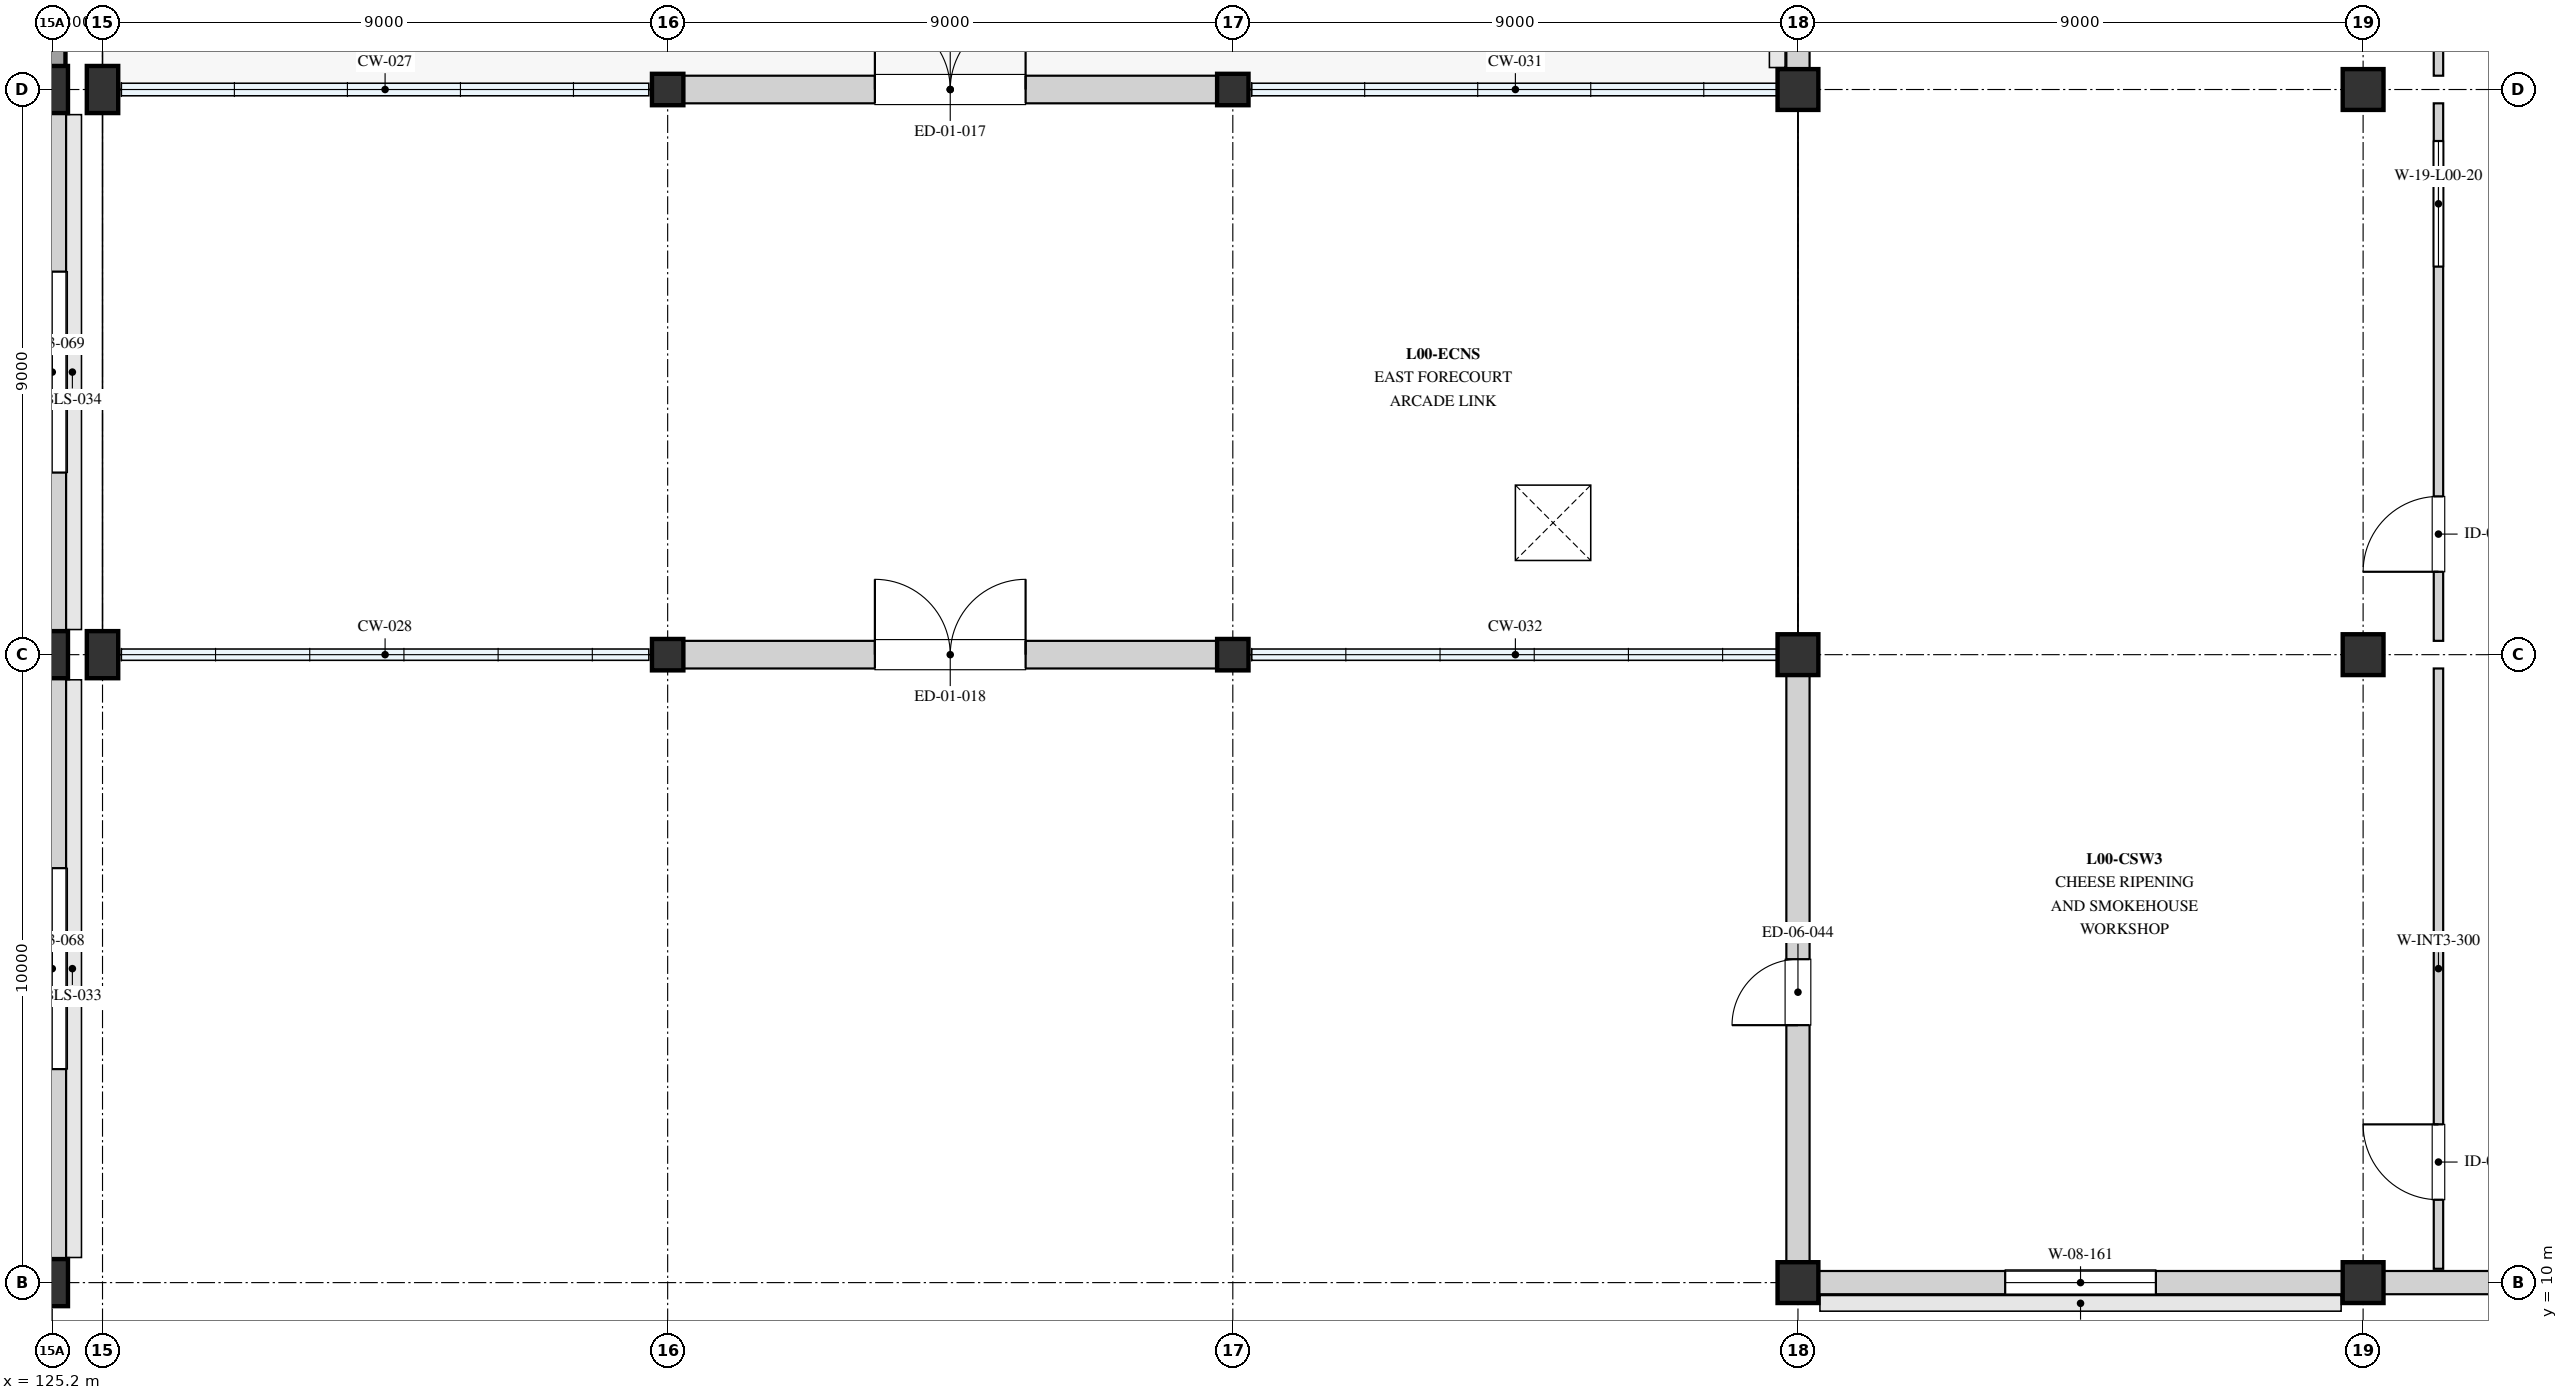
"""IFC4 building model, lengths in metres.
Left out: names, types, materials, properties, quantities, classifications, styles, units other than length and angle.
Written with IfcOpenShell. Run it as: python <this file> out.ifc"""

import sys

from ifc_helpers import new_model, si_unit, direction, frame, frame_2d, origin, origin_2d, place, context, subcontext, project, spatial, rectangle, extrude, element, fill, save


model = new_model("IFC4")
c1 = context("Model", 3, precision=1e-05, world=origin(), true_north=direction((0.0, 1.0)))
c2 = subcontext(c1, "Body", "Model", "MODEL_VIEW")
j1 = project(units=[si_unit("LENGTHUNIT", "METRE"), si_unit("PLANEANGLEUNIT", "RADIAN")], contexts=[c1])
p1 = place(None, origin())
s1 = spatial("IfcSite", under=j1, at=p1, CompositionType="ELEMENT")
p2 = place(p1, origin())
s2 = spatial("IfcBuilding", under=s1, at=p2, CompositionType="ELEMENT")
p3 = place(p2, origin())
s3 = spatial("IfcBuildingStorey", under=s2, at=p3, CompositionType="ELEMENT", Elevation=0.0)
for number, where, z_axis, x_axis in (
    (1, (125.2, 10.0, 0.0), (0.0, 0.0, 1.0), (1.0, 0.0, 0.0)),
    (2, (125.2, 20.0, 0.0), (0.0, 0.0, 1.0), (1.0, 0.0, 0.0)),
):
    element("IfcColumn", number, at=place(p3, frame(where, z_axis=z_axis, x_axis=x_axis)), inside=s3, PredefinedType="COLUMN", context=c2, shape_type="SweptSolid", body=[
        extrude(rectangle(XDim=0.5, YDim=0.75, at=origin_2d()), origin(), (0.0, 0.0, 1.0), 4.06),
    ])
for number, where, z_axis, x_axis in (
    (3, (125.2, 29.0, 0.0), (0.0, 0.0, 1.0), (1.0, 0.0, 0.0)),
    (4, (126.0, 20.0, 0.0), (0.0, 0.0, 1.0), (1.0, 0.0, 0.0)),
    (5, (126.0, 29.0, 0.0), (0.0, 0.0, 1.0), (1.0, 0.0, 0.0)),
):
    element("IfcColumn", number, at=place(p3, frame(where, z_axis=z_axis, x_axis=x_axis)), inside=s3, PredefinedType="COLUMN", context=c2, shape_type="SweptSolid", body=[
        extrude(rectangle(XDim=0.5, YDim=0.75, at=origin_2d()), origin(), (0.0, 0.0, 1.0), 4.5),
    ])
for number, where, z_axis, x_axis in (
    (6, (135.0, 20.0, 0.0), (0.0, 0.0, 1.0), (1.0, 0.0, 0.0)),
    (7, (135.0, 29.0, 0.0), (0.0, 0.0, 1.0), (1.0, 0.0, 0.0)),
    (8, (144.0, 20.0, 0.0), (0.0, 0.0, 1.0), (1.0, 0.0, 0.0)),
    (9, (144.0, 29.0, 0.0), (0.0, 0.0, 1.0), (1.0, 0.0, 0.0)),
):
    element("IfcColumn", number, at=place(p3, frame(where, z_axis=z_axis, x_axis=x_axis)), inside=s3, PredefinedType="COLUMN", context=c2, shape_type="SweptSolid", body=[
        extrude(rectangle(XDim=0.5, YDim=0.5, at=origin_2d()), origin(), (0.0, 0.0, 1.0), 4.5),
    ])
for number, where, z_axis, x_axis in (
    (10, (153.0, 10.0, 0.0), (0.0, 0.0, 1.0), (1.0, 0.0, 0.0)),
    (11, (153.0, 20.0, 0.0), (0.0, 0.0, 1.0), (1.0, 0.0, 0.0)),
    (12, (153.0, 29.0, 0.0), (0.0, 0.0, 1.0), (1.0, 0.0, 0.0)),
    (13, (162.0, 10.0, 0.0), (0.0, 0.0, 1.0), (1.0, 0.0, 0.0)),
    (14, (162.0, 20.0, 0.0), (0.0, 0.0, 1.0), (1.0, 0.0, 0.0)),
    (15, (162.0, 29.0, 0.0), (0.0, 0.0, 1.0), (1.0, 0.0, 0.0)),
):
    element("IfcColumn", number, at=place(p3, frame(where, z_axis=z_axis, x_axis=x_axis)), inside=s3, PredefinedType="COLUMN", context=c2, shape_type="SweptSolid", body=[
        extrude(rectangle(XDim=0.65, YDim=0.65, at=origin_2d()), origin(), (0.0, 0.0, 1.0), 4.5),
    ])
p4 = place(p3, frame((135.0, 29.0, 0.0), z_axis=(0.0, 0.0, 1.0), x_axis=(1.0, 0.0, 0.0)))
e16 = element("IfcWall", 16, at=p4, inside=s3, PredefinedType="STANDARD", context=c2, shape_type="SweptSolid", body=[
    extrude(rectangle(XDim=9.0, YDim=0.44, at=frame_2d((4.5, 0.0))), origin(), (0.0, 0.0, 1.0), 3.6),
])
p5 = place(p4, frame((3.3, 0.0, 0.0)))
e17 = element("IfcOpeningElement", 17, at=p5, cuts=e16, PredefinedType="OPENING", context=c2, shape_type="SweptSolid", body=[
    extrude(rectangle(XDim=2.4, YDim=2.6, at=frame_2d((1.2, 1.3))), frame((0.0, 0.23, 0.0), z_axis=(0.0, -1.0, 0.0), x_axis=(1.0, 0.0, 0.0)), (0.0, 0.0, 1.0), 0.46),
])
p6 = place(p3, frame((135.0, 20.0, 0.0), z_axis=(0.0, 0.0, 1.0), x_axis=(1.0, 0.0, 0.0)))
e18 = element("IfcWall", 18, at=p6, inside=s3, PredefinedType="STANDARD", context=c2, shape_type="SweptSolid", body=[
    extrude(rectangle(XDim=9.0, YDim=0.44, at=frame_2d((4.5, 0.0))), origin(), (0.0, 0.0, 1.0), 3.6),
])
p7 = place(p6, frame((3.3, 0.0, 0.0)))
e19 = element("IfcOpeningElement", 19, at=p7, cuts=e18, PredefinedType="OPENING", context=c2, shape_type="SweptSolid", body=[
    extrude(rectangle(XDim=2.4, YDim=2.6, at=frame_2d((1.2, 1.3))), frame((0.0, 0.23, 0.0), z_axis=(0.0, -1.0, 0.0), x_axis=(1.0, 0.0, 0.0)), (0.0, 0.0, 1.0), 0.46),
])
p8 = place(p3, frame((117.0, 10.0, 0.0), z_axis=(0.0, 0.0, 1.0), x_axis=(1.0, 0.0, 0.0)))
e20 = element("IfcWall", 20, at=p8, inside=s3, PredefinedType="STANDARD", context=c2, shape_type="SweptSolid", body=[
    extrude(rectangle(XDim=8.2, YDim=0.44, at=frame_2d((4.1, 0.0))), origin(), (0.0, 0.0, 1.0), 3.19),
])
p9 = place(p8, frame((3.2, 0.0, 0.0)))
e21 = element("IfcOpeningElement", 21, at=p9, cuts=e20, PredefinedType="OPENING", context=c2, shape_type="SweptSolid", body=[
    extrude(rectangle(XDim=1.1, YDim=2.2, at=frame_2d((0.55, 1.1))), frame((0.0, 0.23, 0.0), z_axis=(0.0, -1.0, 0.0), x_axis=(1.0, 0.0, 0.0)), (0.0, 0.0, 1.0), 0.46),
])
p10 = place(p3, frame((125.2, 10.0, 0.0), z_axis=(0.0, 0.0, 1.0), x_axis=(0.0, 1.0, 0.0)))
e22 = element("IfcWall", 22, at=p10, inside=s3, PredefinedType="STANDARD", context=c2, shape_type="SweptSolid", body=[
    extrude(rectangle(XDim=10.0, YDim=0.44, at=frame_2d((5.0, 0.0))), origin(), (0.0, 0.0, 1.0), 3.19),
])
p11 = place(p10, frame((3.4, 0.0, 1.5)))
e23 = element("IfcOpeningElement", 23, at=p11, cuts=e22, PredefinedType="OPENING", context=c2, shape_type="SweptSolid", body=[
    extrude(rectangle(XDim=3.2, YDim=1.5, at=frame_2d((1.6, 0.75))), frame((0.0, 0.23, 0.0), z_axis=(0.0, -1.0, 0.0), x_axis=(1.0, 0.0, 0.0)), (0.0, 0.0, 1.0), 0.46),
])
p12 = place(p3, frame((125.2, 20.0, 0.0), z_axis=(0.0, 0.0, 1.0), x_axis=(0.0, 1.0, 0.0)))
e24 = element("IfcWall", 24, at=p12, inside=s3, PredefinedType="STANDARD", context=c2, shape_type="SweptSolid", body=[
    extrude(rectangle(XDim=9.0, YDim=0.44, at=frame_2d((4.5, 0.0))), origin(), (0.0, 0.0, 1.0), 3.19),
])
p13 = place(p12, frame((2.9, 0.0, 1.5)))
e25 = element("IfcOpeningElement", 25, at=p13, cuts=e24, PredefinedType="OPENING", context=c2, shape_type="SweptSolid", body=[
    extrude(rectangle(XDim=3.2, YDim=1.5, at=frame_2d((1.6, 0.75))), frame((0.0, 0.23, 0.0), z_axis=(0.0, -1.0, 0.0), x_axis=(1.0, 0.0, 0.0)), (0.0, 0.0, 1.0), 0.46),
])
p14 = place(p3, frame((125.2, 29.0, 0.0), z_axis=(0.0, 0.0, 1.0), x_axis=(0.0, 1.0, 0.0)))
e26 = element("IfcWall", 26, at=p14, inside=s3, PredefinedType="STANDARD", context=c2, shape_type="SweptSolid", body=[
    extrude(rectangle(XDim=9.0, YDim=0.42, at=frame_2d((4.5, 0.0))), origin(), (0.0, 0.0, 1.0), 4.24),
])
p15 = place(p3, frame((153.0, 10.0, 0.0), z_axis=(0.0, 0.0, 1.0), x_axis=(0.0, 1.0, 0.0)))
e27 = element("IfcWall", 27, at=p15, inside=s3, PredefinedType="STANDARD", context=c2, shape_type="SweptSolid", body=[
    extrude(rectangle(XDim=10.0, YDim=0.37, at=frame_2d((5.0, 0.0))), origin(), (0.0, 0.0, 1.0), 3.38),
])
p16 = place(p15, frame((4.1, 0.0, 0.0)))
e28 = element("IfcOpeningElement", 28, at=p16, cuts=e27, PredefinedType="OPENING", context=c2, shape_type="SweptSolid", body=[
    extrude(rectangle(XDim=1.05, YDim=2.15, at=frame_2d((0.525, 1.075))), frame((0.0, 0.195, 0.0), z_axis=(0.0, -1.0, 0.0), x_axis=(1.0, 0.0, 0.0)), (0.0, 0.0, 1.0), 0.39),
])
p17 = place(p3, frame((153.0, 29.0, 0.0), z_axis=(0.0, 0.0, 1.0), x_axis=(0.0, 1.0, 0.0)))
e29 = element("IfcWall", 29, at=p17, inside=s3, PredefinedType="STANDARD", context=c2, shape_type="SweptSolid", body=[
    extrude(rectangle(XDim=9.0, YDim=0.37, at=frame_2d((4.5, 0.0))), origin(), (0.0, 0.0, 1.0), 3.38),
])
p18 = place(p17, frame((3.3, 0.0, 0.9)))
e30 = element("IfcOpeningElement", 30, at=p18, cuts=e29, PredefinedType="OPENING", context=c2, shape_type="SweptSolid", body=[
    extrude(rectangle(XDim=2.4, YDim=2.0, at=frame_2d((1.2, 1.0))), frame((0.0, 0.195, 0.0), z_axis=(0.0, -1.0, 0.0), x_axis=(1.0, 0.0, 0.0)), (0.0, 0.0, 1.0), 0.39),
])
p19 = place(p3, frame((153.0, 10.0, 0.0), z_axis=(0.0, 0.0, 1.0), x_axis=(1.0, 0.0, 0.0)))
e31 = element("IfcWall", 31, at=p19, inside=s3, PredefinedType="STANDARD", context=c2, shape_type="SweptSolid", body=[
    extrude(rectangle(XDim=9.0, YDim=0.37, at=frame_2d((4.5, 0.0))), origin(), (0.0, 0.0, 1.0), 3.38),
])
p20 = place(p19, frame((3.3, 0.0, 0.9)))
e32 = element("IfcOpeningElement", 32, at=p20, cuts=e31, PredefinedType="OPENING", context=c2, shape_type="SweptSolid", body=[
    extrude(rectangle(XDim=2.4, YDim=2.0, at=frame_2d((1.2, 1.0))), frame((0.0, 0.195, 0.0), z_axis=(0.0, -1.0, 0.0), x_axis=(1.0, 0.0, 0.0)), (0.0, 0.0, 1.0), 0.39),
])
p21 = place(p3, frame((162.0, 10.0, 0.0), z_axis=(0.0, 0.0, 1.0), x_axis=(1.0, 0.0, 0.0)))
e33 = element("IfcWall", 33, at=p21, inside=s3, PredefinedType="STANDARD", context=c2, shape_type="SweptSolid", body=[
    extrude(rectangle(XDim=9.0, YDim=0.37, at=frame_2d((4.5, 0.0))), origin(), (0.0, 0.0, 1.0), 3.38),
])
p22 = place(p21, frame((3.45, 0.0, 0.0)))
e34 = element("IfcOpeningElement", 34, at=p22, cuts=e33, PredefinedType="OPENING", context=c2, shape_type="SweptSolid", body=[
    extrude(rectangle(XDim=2.1, YDim=2.5, at=frame_2d((1.05, 1.25))), frame((0.0, 0.195, 0.0), z_axis=(0.0, -1.0, 0.0), x_axis=(1.0, 0.0, 0.0)), (0.0, 0.0, 1.0), 0.39),
])
p23 = place(p3, frame((163.2, 10.22, 0.0), z_axis=(0.0, 0.0, 1.0), x_axis=(0.0, 1.0, 0.0)))
e35 = element("IfcWall", 35, at=p23, inside=s3, PredefinedType="PARTITIONING", context=c2, shape_type="SweptSolid", body=[
    extrude(rectangle(XDim=9.56, YDim=0.15, at=frame_2d((4.78, 0.0))), origin(), (0.0, 0.0, 1.0), 3.2),
])
p24 = place(p23, frame((1.1, 0.0, 0.0)))
e36 = element("IfcOpeningElement", 36, at=p24, cuts=e35, PredefinedType="OPENING", context=c2, shape_type="SweptSolid", body=[
    extrude(rectangle(XDim=1.2, YDim=2.15, at=frame_2d((0.6, 1.075))), frame((0.0, 0.085, 0.0), z_axis=(0.0, -1.0, 0.0), x_axis=(1.0, 0.0, 0.0)), (0.0, 0.0, 1.0), 0.17),
])
p25 = place(p3, frame((163.2, 20.22, 0.0), z_axis=(0.0, 0.0, 1.0), x_axis=(0.0, 1.0, 0.0)))
e37 = element("IfcWall", 37, at=p25, inside=s3, PredefinedType="PARTITIONING", context=c2, shape_type="SweptSolid", body=[
    extrude(rectangle(XDim=8.56, YDim=0.15, at=frame_2d((4.28, 0.0))), origin(), (0.0, 0.0, 1.0), 3.2),
])
p26 = place(p25, frame((1.1, 0.0, 0.0)))
e38 = element("IfcOpeningElement", 38, at=p26, cuts=e37, PredefinedType="OPENING", context=c2, shape_type="SweptSolid", body=[
    extrude(rectangle(XDim=1.2, YDim=2.15, at=frame_2d((0.6, 1.075))), frame((0.0, 0.085, 0.0), z_axis=(0.0, -1.0, 0.0), x_axis=(1.0, 0.0, 0.0)), (0.0, 0.0, 1.0), 0.17),
])
p27 = place(p25, frame((5.96, 0.0, 1.05)))
e39 = element("IfcOpeningElement", 39, at=p27, cuts=e37, PredefinedType="OPENING", context=c2, shape_type="SweptSolid", body=[
    extrude(rectangle(XDim=2.0, YDim=1.35, at=frame_2d((1.0, 0.675))), frame((0.0, 0.085, 0.0), z_axis=(0.0, -1.0, 0.0), x_axis=(1.0, 0.0, 0.0)), (0.0, 0.0, 1.0), 0.17),
])
p28 = place(p3, frame((163.2, 29.22, 0.0), z_axis=(0.0, 0.0, 1.0), x_axis=(0.0, 1.0, 0.0)))
e40 = element("IfcWall", 40, at=p28, inside=s3, PredefinedType="PARTITIONING", context=c2, shape_type="SweptSolid", body=[
    extrude(rectangle(XDim=8.56, YDim=0.15, at=frame_2d((4.28, 0.0))), origin(), (0.0, 0.0, 1.0), 3.2),
])
p29 = place(p28, frame((1.1, 0.0, 0.0)))
e41 = element("IfcOpeningElement", 41, at=p29, cuts=e40, PredefinedType="OPENING", context=c2, shape_type="SweptSolid", body=[
    extrude(rectangle(XDim=1.2, YDim=2.15, at=frame_2d((0.6, 1.075))), frame((0.0, 0.085, 0.0), z_axis=(0.0, -1.0, 0.0), x_axis=(1.0, 0.0, 0.0)), (0.0, 0.0, 1.0), 0.17),
])
p30 = place(p28, frame((5.96, 0.0, 1.05)))
e42 = element("IfcOpeningElement", 42, at=p30, cuts=e40, PredefinedType="OPENING", context=c2, shape_type="SweptSolid", body=[
    extrude(rectangle(XDim=2.0, YDim=1.35, at=frame_2d((1.0, 0.675))), frame((0.0, 0.085, 0.0), z_axis=(0.0, -1.0, 0.0), x_axis=(1.0, 0.0, 0.0)), (0.0, 0.0, 1.0), 0.17),
])
p31 = place(p5, origin())
e43 = element("IfcDoor", 43, at=p31, inside=s3, OperationType="DOUBLE_DOOR_SINGLE_SWING", PredefinedType="DOOR", context=c2, shape_type="SweptSolid", body=[
    extrude(rectangle(XDim=2.4, YDim=2.6, at=frame_2d((1.2, 1.3))), frame((0.0, 0.025, 0.0), z_axis=(0.0, -1.0, 0.0), x_axis=(1.0, 0.0, 0.0)), (0.0, 0.0, 1.0), 0.05),
])
fill(e17, e43)
p32 = place(p7, origin())
e44 = element("IfcDoor", 44, at=p32, inside=s3, OperationType="DOUBLE_DOOR_SINGLE_SWING", PredefinedType="DOOR", context=c2, shape_type="SweptSolid", body=[
    extrude(rectangle(XDim=2.4, YDim=2.6, at=frame_2d((1.2, 1.3))), frame((0.0, 0.025, 0.0), z_axis=(0.0, -1.0, 0.0), x_axis=(1.0, 0.0, 0.0)), (0.0, 0.0, 1.0), 0.05),
])
fill(e19, e44)
p33 = place(p11, origin())
e45 = element("IfcWindow", 45, at=p33, inside=s3, PartitioningType="SINGLE_PANEL", PredefinedType="WINDOW", context=c2, shape_type="SweptSolid", body=[
    extrude(rectangle(XDim=3.2, YDim=1.5, at=frame_2d((1.6, 0.75))), frame((0.0, 0.03, 0.0), z_axis=(0.0, -1.0, 0.0), x_axis=(1.0, 0.0, 0.0)), (0.0, 0.0, 1.0), 0.06),
])
fill(e23, e45)
p34 = place(p13, origin())
e46 = element("IfcWindow", 46, at=p34, inside=s3, PartitioningType="SINGLE_PANEL", PredefinedType="WINDOW", context=c2, shape_type="SweptSolid", body=[
    extrude(rectangle(XDim=3.2, YDim=1.5, at=frame_2d((1.6, 0.75))), frame((0.0, 0.03, 0.0), z_axis=(0.0, -1.0, 0.0), x_axis=(1.0, 0.0, 0.0)), (0.0, 0.0, 1.0), 0.06),
])
fill(e25, e46)
p35 = place(p16, origin())
e47 = element("IfcDoor", 47, at=p35, inside=s3, OperationType="SINGLE_SWING_LEFT", PredefinedType="DOOR", context=c2, shape_type="SweptSolid", body=[
    extrude(rectangle(XDim=1.05, YDim=2.15, at=frame_2d((0.525, 1.075))), frame((0.0, 0.025, 0.0), z_axis=(0.0, -1.0, 0.0), x_axis=(1.0, 0.0, 0.0)), (0.0, 0.0, 1.0), 0.05),
])
fill(e28, e47)
p36 = place(p20, origin())
e48 = element("IfcWindow", 48, at=p36, inside=s3, PartitioningType="SINGLE_PANEL", PredefinedType="WINDOW", context=c2, shape_type="SweptSolid", body=[
    extrude(rectangle(XDim=2.4, YDim=2.0, at=frame_2d((1.2, 1.0))), frame((0.0, 0.03, 0.0), z_axis=(0.0, -1.0, 0.0), x_axis=(1.0, 0.0, 0.0)), (0.0, 0.0, 1.0), 0.06),
])
fill(e32, e48)
p37 = place(p24, origin())
e49 = element("IfcDoor", 49, at=p37, inside=s3, OperationType="SINGLE_SWING_RIGHT", PredefinedType="DOOR", context=c2, shape_type="SweptSolid", body=[
    extrude(rectangle(XDim=1.2, YDim=2.15, at=frame_2d((0.6, 1.075))), frame((0.0, 0.025, 0.0), z_axis=(0.0, -1.0, 0.0), x_axis=(1.0, 0.0, 0.0)), (0.0, 0.0, 1.0), 0.05),
])
fill(e36, e49)
p38 = place(p26, origin())
e50 = element("IfcDoor", 50, at=p38, inside=s3, OperationType="SINGLE_SWING_LEFT", PredefinedType="DOOR", context=c2, shape_type="SweptSolid", body=[
    extrude(rectangle(XDim=1.2, YDim=2.15, at=frame_2d((0.6, 1.075))), frame((0.0, 0.025, 0.0), z_axis=(0.0, -1.0, 0.0), x_axis=(1.0, 0.0, 0.0)), (0.0, 0.0, 1.0), 0.05),
])
fill(e38, e50)
p39 = place(p27, origin())
e51 = element("IfcWindow", 51, at=p39, inside=s3, PartitioningType="SINGLE_PANEL", PredefinedType="WINDOW", context=c2, shape_type="SweptSolid", body=[
    extrude(rectangle(XDim=2.0, YDim=1.35, at=frame_2d((1.0, 0.675))), frame((0.0, 0.03, 0.0), z_axis=(0.0, -1.0, 0.0), x_axis=(1.0, 0.0, 0.0)), (0.0, 0.0, 1.0), 0.06),
])
fill(e39, e51)
save(model, sys.argv[1])
